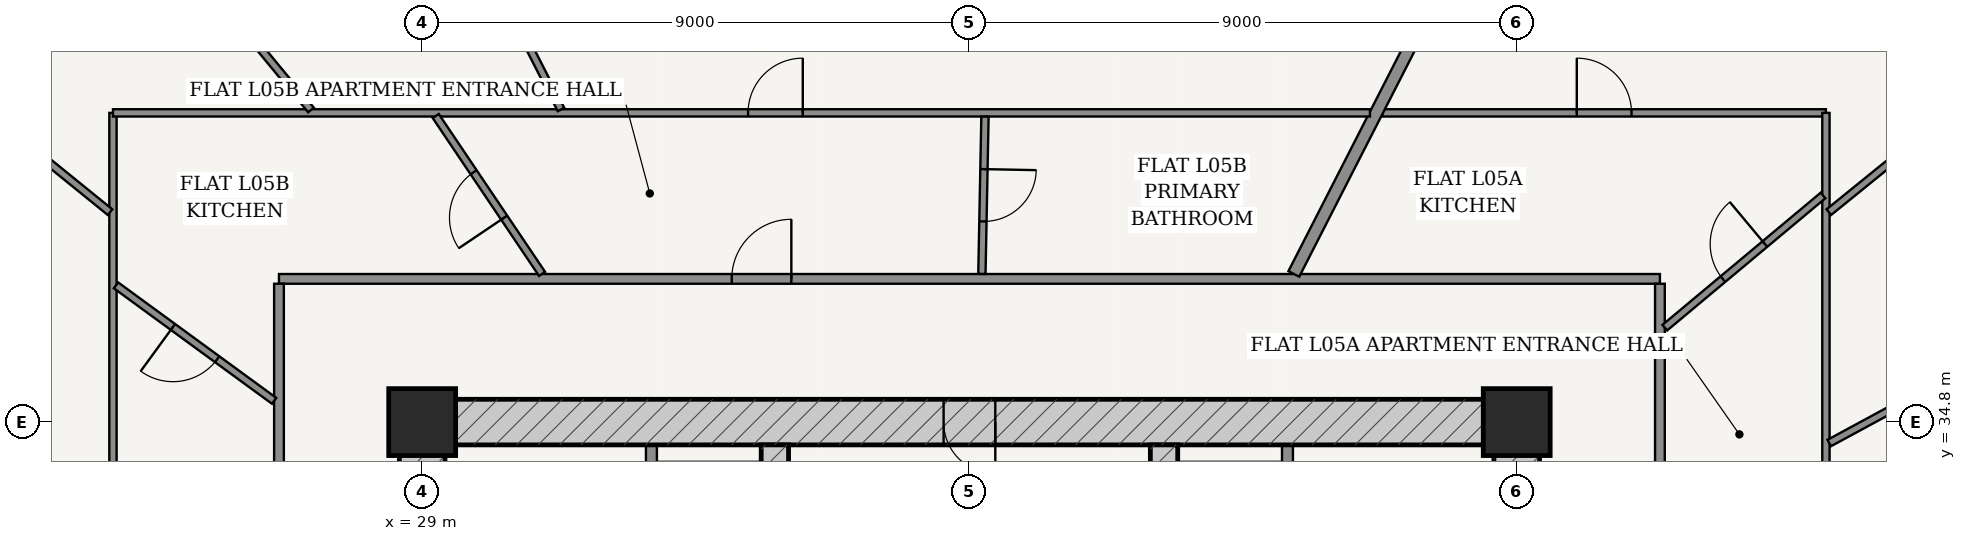
"""IFC4 building model, lengths in metres.
Left out: names, types, materials, properties, quantities, classifications, styles, units other than length and angle.
Written with IfcOpenShell. Run it as: python <this file> out.ifc"""

import sys

from ifc_helpers import new_model, si_unit, direction, frame, frame_2d, origin, origin_2d, place, context, subcontext, project, spatial, rectangle, extrude, source, transform, mapped, element, fill, save


model = new_model("IFC4")
c1 = context("Model", 3, precision=1e-05, world=origin(), true_north=direction((-0.2419218956, 0.970295726276)))
c2 = subcontext(c1, "Body", "Model", "MODEL_VIEW")
j1 = project(units=[si_unit("LENGTHUNIT", "METRE"), si_unit("PLANEANGLEUNIT", "RADIAN")], contexts=[c1])
p1 = place(None, origin())
s1 = spatial("IfcSite", under=j1, at=p1, CompositionType="ELEMENT")
p2 = place(p1, origin())
s2 = spatial("IfcBuilding", under=s1, at=p2, CompositionType="ELEMENT")
p3 = place(p2, frame((0.0, 0.0, 24.0)))
s3 = spatial("IfcBuildingStorey", under=s2, at=p3, CompositionType="ELEMENT", Elevation=24.0)
for number, where, z_axis, x_axis in (
    (1, (47.0, 34.8, 0.0), (0.0, 0.0, 1.0), (1.0, 0.0, 0.0)),
    (2, (29.0, 34.8, 0.0), (0.0, 0.0, 1.0), (1.0, 0.0, 0.0)),
):
    element("IfcColumn", number, at=place(p3, frame(where, z_axis=z_axis, x_axis=x_axis)), inside=s3, PredefinedType="COLUMN", context=c2, shape_type="SweptSolid", body=[
        extrude(rectangle(XDim=1.1, YDim=1.1, at=origin_2d()), origin(), (0.0, 0.0, 1.0), 3.6),
    ])
p4 = place(p3, frame((28.625, 34.8, 0.0), z_axis=(0.0, 0.0, 1.0), x_axis=(1.0, 0.0, 0.0)))
e3 = element("IfcWall", 3, at=p4, inside=s3, PredefinedType="SHEAR", context=c2, shape_type="SweptSolid", body=[
    extrude(rectangle(XDim=18.75, YDim=0.75, at=frame_2d((9.375, 0.0))), origin(), (0.0, 0.0, 1.0), 3.32),
])
p5 = place(p4, frame((8.95, 0.0, 0.0)))
e4 = element("IfcOpeningElement", 4, at=p5, cuts=e3, PredefinedType="OPENING", context=c2, shape_type="SweptSolid", body=[
    extrude(rectangle(XDim=0.85, YDim=2.1, at=frame_2d((0.425, 1.05))), frame((0.0, 0.385, 0.0), z_axis=(0.0, -1.0, 0.0), x_axis=(1.0, 0.0, 0.0)), (0.0, 0.0, 1.0), 0.77),
])
p6 = place(p3, frame((29.0, 19.175, 0.0), z_axis=(0.0, 0.0, 1.0), x_axis=(0.0, 1.0, 0.0)))
e5 = element("IfcWall", 5, at=p6, inside=s3, PredefinedType="SHEAR", context=c2, shape_type="SweptSolid", body=[
    extrude(rectangle(XDim=15.25, YDim=0.75, at=frame_2d((7.625, 0.0))), origin(), (0.0, 0.0, 1.0), 3.32),
])
p7 = place(p6, frame((9.875, 0.0, 0.0)))
e6 = element("IfcOpeningElement", 6, at=p7, cuts=e5, PredefinedType="OPENING", context=c2, shape_type="SweptSolid", body=[
    extrude(rectangle(XDim=1.5, YDim=2.2, at=frame_2d((0.75, 1.1))), frame((0.0, 0.385, 0.0), z_axis=(0.0, -1.0, 0.0), x_axis=(1.0, 0.0, 0.0)), (0.0, 0.0, 1.0), 0.77),
])
p8 = place(p3, frame((47.0, 19.175, 0.0), z_axis=(0.0, 0.0, 1.0), x_axis=(0.0, 1.0, 0.0)))
e7 = element("IfcWall", 7, at=p8, inside=s3, PredefinedType="SHEAR", context=c2, shape_type="SweptSolid", body=[
    extrude(rectangle(XDim=15.25, YDim=0.75, at=frame_2d((7.625, 0.0))), origin(), (0.0, 0.0, 1.0), 3.32),
])
p9 = place(p8, frame((9.875, 0.0, 0.0)))
e8 = element("IfcOpeningElement", 8, at=p9, cuts=e7, PredefinedType="OPENING", context=c2, shape_type="SweptSolid", body=[
    extrude(rectangle(XDim=1.5, YDim=2.2, at=frame_2d((0.75, 1.1))), frame((0.0, 0.385, 0.0), z_axis=(0.0, -1.0, 0.0), x_axis=(1.0, 0.0, 0.0)), (0.0, 0.0, 1.0), 0.77),
])
p10 = place(p3, frame((34.8, 19.175, 0.0), z_axis=(0.0, 0.0, 1.0), x_axis=(0.0, 1.0, 0.0)))
e9 = element("IfcWall", 9, at=p10, inside=s3, PredefinedType="SHEAR", context=c2, shape_type="SweptSolid", body=[
    extrude(rectangle(XDim=15.25, YDim=0.45, at=frame_2d((7.625, 0.0))), origin(), (0.0, 0.0, 1.0), 3.32),
])
p11 = place(p10, frame((7.8, 0.0, 0.0)))
e10 = element("IfcOpeningElement", 10, at=p11, cuts=e9, PredefinedType="OPENING", context=c2, shape_type="SweptSolid", body=[
    extrude(rectangle(XDim=1.05, YDim=2.15, at=frame_2d((0.525, 1.075))), frame((0.0, 0.235, 0.0), z_axis=(0.0, -1.0, 0.0), x_axis=(1.0, 0.0, 0.0)), (0.0, 0.0, 1.0), 0.47),
])
p12 = place(p3, frame((41.2, 19.175, 0.0), z_axis=(0.0, 0.0, 1.0), x_axis=(0.0, 1.0, 0.0)))
e11 = element("IfcWall", 11, at=p12, inside=s3, PredefinedType="SHEAR", context=c2, shape_type="SweptSolid", body=[
    extrude(rectangle(XDim=15.25, YDim=0.45, at=frame_2d((7.625, 0.0))), origin(), (0.0, 0.0, 1.0), 3.32),
])
p13 = place(p12, frame((7.8, 0.0, 0.0)))
e12 = element("IfcOpeningElement", 12, at=p13, cuts=e11, PredefinedType="OPENING", context=c2, shape_type="SweptSolid", body=[
    extrude(rectangle(XDim=1.05, YDim=2.15, at=frame_2d((0.525, 1.075))), frame((0.0, 0.235, 0.0), z_axis=(0.0, -1.0, 0.0), x_axis=(1.0, 0.0, 0.0)), (0.0, 0.0, 1.0), 0.47),
])
p14 = place(p3, frame((32.77, 28.52, 0.0), z_axis=(0.0, 0.0, 1.0), x_axis=(0.0, 1.0, 0.0)))
e13 = element("IfcWall", 13, at=p14, inside=s3, PredefinedType="PARTITIONING", context=c2, shape_type="SweptSolid", body=[
    extrude(rectangle(XDim=5.905, YDim=0.18, at=frame_2d((2.953, 0.0))), origin(), (0.0, 0.0, 1.0), 3.32),
])
p15 = place(p14, frame((3.655, 0.0, 0.0)))
e14 = element("IfcOpeningElement", 14, at=p15, cuts=e13, PredefinedType="OPENING", context=c2, shape_type="SweptSolid", body=[
    extrude(rectangle(XDim=1.15, YDim=2.2, at=frame_2d((0.575, 1.1))), frame((0.0, 0.1, 0.0), z_axis=(0.0, -1.0, 0.0), x_axis=(1.0, 0.0, 0.0)), (0.0, 0.0, 1.0), 0.2),
])
p16 = place(p14, frame((0.73, 0.0, 0.0)))
e15 = element("IfcOpeningElement", 15, at=p16, cuts=e13, PredefinedType="OPENING", context=c2, shape_type="SweptSolid", body=[
    extrude(rectangle(XDim=1.2, YDim=2.25, at=frame_2d((0.6, 1.125))), frame((0.0, 0.1, 0.0), z_axis=(0.0, -1.0, 0.0), x_axis=(1.0, 0.0, 0.0)), (0.0, 0.0, 1.0), 0.2),
])
p17 = place(p3, frame((43.23, 28.52, 0.0), z_axis=(0.0, 0.0, 1.0), x_axis=(0.0, 1.0, 0.0)))
e16 = element("IfcWall", 16, at=p17, inside=s3, PredefinedType="PARTITIONING", context=c2, shape_type="SweptSolid", body=[
    extrude(rectangle(XDim=5.905, YDim=0.18, at=frame_2d((2.953, 0.0))), origin(), (0.0, 0.0, 1.0), 3.32),
])
p18 = place(p17, frame((3.655, 0.0, 0.0)))
e17 = element("IfcOpeningElement", 17, at=p18, cuts=e16, PredefinedType="OPENING", context=c2, shape_type="SweptSolid", body=[
    extrude(rectangle(XDim=1.15, YDim=2.2, at=frame_2d((0.575, 1.1))), frame((0.0, 0.1, 0.0), z_axis=(0.0, -1.0, 0.0), x_axis=(1.0, 0.0, 0.0)), (0.0, 0.0, 1.0), 0.2),
])
p19 = place(p3, frame((26.645, 37.155, 0.0), z_axis=(0.0, 0.0, 1.0), x_axis=(1.0, 0.0, 0.0)))
e18 = element("IfcWall", 18, at=p19, inside=s3, PredefinedType="PARTITIONING", context=c2, shape_type="SweptSolid", body=[
    extrude(rectangle(XDim=22.71, YDim=0.16, at=frame_2d((11.355, 0.0))), origin(), (0.0, 0.0, 1.0), 2.688),
])
p20 = place(p19, frame((7.446, 0.0, 0.0)))
e19 = element("IfcOpeningElement", 19, at=p20, cuts=e18, PredefinedType="OPENING", context=c2, shape_type="SweptSolid", body=[
    extrude(rectangle(XDim=0.98, YDim=2.2, at=frame_2d((0.49, 1.1))), frame((0.0, 0.09, 0.0), z_axis=(0.0, -1.0, 0.0), x_axis=(1.0, 0.0, 0.0)), (0.0, 0.0, 1.0), 0.18),
])
p21 = place(p3, frame((26.645, 16.525, 0.0), z_axis=(0.0, 0.0, 1.0), x_axis=(0.0, 1.0, 0.0)))
e20 = element("IfcWall", 20, at=p21, inside=s3, PredefinedType="PARTITIONING", context=c2, shape_type="SweptSolid", body=[
    extrude(rectangle(XDim=20.55, YDim=0.16, at=frame_2d((10.275, 0.0))), origin(), (0.0, 0.0, 1.0), 2.688),
])
p22 = place(p3, frame((49.355, 16.525, 0.0), z_axis=(0.0, 0.0, 1.0), x_axis=(0.0, 1.0, 0.0)))
e21 = element("IfcWall", 21, at=p22, inside=s3, PredefinedType="PARTITIONING", context=c2, shape_type="SweptSolid", body=[
    extrude(rectangle(XDim=20.55, YDim=0.16, at=frame_2d((10.275, 0.0))), origin(), (0.0, 0.0, 1.0), 2.688),
])
p23 = place(p22, frame((15.635, 0.0, 0.0)))
e22 = element("IfcOpeningElement", 22, at=p23, cuts=e21, PredefinedType="OPENING", context=c2, shape_type="SweptSolid", body=[
    extrude(rectangle(XDim=0.98, YDim=2.2, at=frame_2d((0.49, 1.1))), frame((0.0, 0.09, 0.0), z_axis=(0.0, -1.0, 0.0), x_axis=(1.0, 0.0, 0.0)), (0.0, 0.0, 1.0), 0.18),
])
p24 = place(p3, frame((44.791, 39.885, 0.0), z_axis=(0.0, 0.0, 1.0), x_axis=(1.0, 0.0, 0.0)))
e23 = element("IfcWall", 23, at=p24, inside=s3, PredefinedType="PARTITIONING", context=c2, shape_type="SweptSolid", body=[
    extrude(rectangle(XDim=7.294, YDim=0.12, at=frame_2d((3.647, 0.0))), origin(), (0.0, 0.0, 1.0), 2.688),
])
p25 = place(p24, frame((3.197, 0.0, 0.0)))
e24 = element("IfcOpeningElement", 24, at=p25, cuts=e23, PredefinedType="OPENING", context=c2, shape_type="SweptSolid", body=[
    extrude(rectangle(XDim=0.9, YDim=2.15, at=frame_2d((0.45, 1.075))), frame((0.0, 0.07, 0.0), z_axis=(0.0, -1.0, 0.0), x_axis=(1.0, 0.0, 0.0)), (0.0, 0.0, 1.0), 0.14),
])
p26 = place(p3, frame((52.085, 39.885, 0.0), z_axis=(0.0, 0.0, 1.0), x_axis=(0.0, -1.0, 0.0)))
e25 = element("IfcWall", 25, at=p26, inside=s3, PredefinedType="PARTITIONING", context=c2, shape_type="SweptSolid", body=[
    extrude(rectangle(XDim=15.253, YDim=0.12, at=frame_2d((7.627, 0.0))), origin(), (0.0, 0.0, 1.0), 2.688),
])
p27 = place(p26, frame((9.002, 0.0, 0.0)))
e26 = element("IfcOpeningElement", 26, at=p27, cuts=e25, PredefinedType="OPENING", context=c2, shape_type="SweptSolid", body=[
    extrude(rectangle(XDim=0.9, YDim=2.15, at=frame_2d((0.45, 1.075))), frame((0.0, 0.07, 0.0), z_axis=(0.0, -1.0, 0.0), x_axis=(1.0, 0.0, 0.0)), (0.0, 0.0, 1.0), 0.14),
])
p28 = place(p3, frame((52.144, 31.547, 0.0), z_axis=(0.0, 0.0, 1.0), x_axis=(0.948017487737, 0.318218231634, 0.0)))
e27 = element("IfcWall", 27, at=p28, inside=s3, PredefinedType="PARTITIONING", context=c2, shape_type="SweptSolid", body=[
    extrude(rectangle(XDim=13.279, YDim=0.12, at=frame_2d((6.639, 0.0))), origin(), (0.0, 0.0, 1.0), 2.762),
])
p29 = place(p28, frame((6.189, 0.0, 0.0)))
e28 = element("IfcOpeningElement", 28, at=p29, cuts=e27, PredefinedType="OPENING", context=c2, shape_type="SweptSolid", body=[
    extrude(rectangle(XDim=0.9, YDim=2.15, at=frame_2d((0.45, 1.075))), frame((0.0, 0.07, 0.0), z_axis=(0.0, -1.0, 0.0), x_axis=(1.0, 0.0, 0.0)), (0.0, 0.0, 1.0), 0.14),
])
p30 = place(p3, frame((52.139, 34.456, 0.0), z_axis=(0.0, 0.0, 1.0), x_axis=(0.879372452045, 0.476134529922, 0.0)))
e29 = element("IfcWall", 29, at=p30, inside=s3, PredefinedType="PARTITIONING", context=c2, shape_type="SweptSolid", body=[
    extrude(rectangle(XDim=11.219, YDim=0.12, at=frame_2d((5.61, 0.0))), origin(), (0.0, 0.0, 1.0), 2.688),
])
p31 = place(p30, frame((4.102, 0.0, 0.0)))
e30 = element("IfcOpeningElement", 30, at=p31, cuts=e29, PredefinedType="OPENING", context=c2, shape_type="SweptSolid", body=[
    extrude(rectangle(XDim=0.9, YDim=2.15, at=frame_2d((0.45, 1.075))), frame((0.0, 0.07, 0.0), z_axis=(0.0, -1.0, 0.0), x_axis=(1.0, 0.0, 0.0)), (0.0, 0.0, 1.0), 0.14),
])
p32 = place(p3, frame((52.133, 38.253, 0.0), z_axis=(0.0, 0.0, 1.0), x_axis=(0.776936623447, 0.629578814087, 0.0)))
e31 = element("IfcWall", 31, at=p32, inside=s3, PredefinedType="PARTITIONING", context=c2, shape_type="SweptSolid", body=[
    extrude(rectangle(XDim=8.136, YDim=0.12, at=frame_2d((4.068, 0.0))), origin(), (0.0, 0.0, 1.0), 2.762),
])
p33 = place(p3, frame((49.435, 36.353, 0.0), z_axis=(0.0, 0.0, 1.0), x_axis=(0.76742398833, 0.641139939589, 0.0)))
e32 = element("IfcWall", 32, at=p33, inside=s3, PredefinedType="PARTITIONING", context=c2, shape_type="SweptSolid", body=[
    extrude(rectangle(XDim=3.391, YDim=0.12, at=frame_2d((1.695, 0.0))), origin(), (0.0, 0.0, 1.0), 2.999),
])
p34 = place(p33, frame((1.246, 0.0, 0.0)))
e33 = element("IfcOpeningElement", 33, at=p34, cuts=e32, PredefinedType="OPENING", context=c2, shape_type="SweptSolid", body=[
    extrude(rectangle(XDim=0.9, YDim=2.15, at=frame_2d((0.45, 1.075))), frame((0.0, 0.07, 0.0), z_axis=(0.0, -1.0, 0.0), x_axis=(1.0, 0.0, 0.0)), (0.0, 0.0, 1.0), 0.14),
])
p35 = place(p3, frame((43.335, 37.237, 0.0), z_axis=(0.0, 0.0, 1.0), x_axis=(0.455148959499, 0.890415310216, 0.0)))
e34 = element("IfcWall", 34, at=p35, inside=s3, PredefinedType="PARTITIONING", context=c2, shape_type="SweptSolid", body=[
    extrude(rectangle(XDim=12.598, YDim=0.2, at=frame_2d((6.299, 0.0))), origin(), (0.0, 0.0, 1.0), 2.762),
])
p36 = place(p3, frame((23.915, 29.172, 0.0), z_axis=(0.0, 0.0, 1.0), x_axis=(0.0, 1.0, 0.0)))
e35 = element("IfcWall", 35, at=p36, inside=s3, PredefinedType="PARTITIONING", context=c2, shape_type="SweptSolid", body=[
    extrude(rectangle(XDim=10.713, YDim=0.12, at=frame_2d((5.356, 0.0))), origin(), (0.0, 0.0, 1.0), 2.688),
])
p37 = place(p36, frame((3.666, 0.0, 0.0)))
e36 = element("IfcOpeningElement", 36, at=p37, cuts=e35, PredefinedType="OPENING", context=c2, shape_type="SweptSolid", body=[
    extrude(rectangle(XDim=0.9, YDim=2.15, at=frame_2d((0.45, 1.075))), frame((0.0, 0.07, 0.0), z_axis=(0.0, -1.0, 0.0), x_axis=(1.0, 0.0, 0.0)), (0.0, 0.0, 1.0), 0.14),
])
p38 = place(p3, frame((23.915, 39.885, 0.0), z_axis=(0.0, 0.0, 1.0), x_axis=(1.0, 0.0, 0.0)))
e37 = element("IfcWall", 37, at=p38, inside=s3, PredefinedType="PARTITIONING", context=c2, shape_type="SweptSolid", body=[
    extrude(rectangle(XDim=20.671, YDim=0.12, at=frame_2d((10.336, 0.0))), origin(), (0.0, 0.0, 1.0), 2.688),
])
p39 = place(p38, frame((10.444, 0.0, 0.0)))
e38 = element("IfcOpeningElement", 38, at=p39, cuts=e37, PredefinedType="OPENING", context=c2, shape_type="SweptSolid", body=[
    extrude(rectangle(XDim=0.9, YDim=2.15, at=frame_2d((0.45, 1.075))), frame((0.0, 0.07, 0.0), z_axis=(0.0, -1.0, 0.0), x_axis=(1.0, 0.0, 0.0)), (0.0, 0.0, 1.0), 0.14),
])
p40 = place(p3, frame((31.283, 39.94, 0.0), z_axis=(0.0, 0.0, 1.0), x_axis=(-0.455131303234, 0.890424335256, 0.0)))
e39 = element("IfcWall", 39, at=p40, inside=s3, PredefinedType="PARTITIONING", context=c2, shape_type="SweptSolid", body=[
    extrude(rectangle(XDim=9.562, YDim=0.12, at=frame_2d((4.781, 0.0))), origin(), (0.0, 0.0, 1.0), 2.762),
])
p41 = place(p40, frame((4.331, 0.0, 0.0)))
e40 = element("IfcOpeningElement", 40, at=p41, cuts=e39, PredefinedType="OPENING", context=c2, shape_type="SweptSolid", body=[
    extrude(rectangle(XDim=0.9, YDim=2.15, at=frame_2d((0.45, 1.075))), frame((0.0, 0.07, 0.0), z_axis=(0.0, -1.0, 0.0), x_axis=(1.0, 0.0, 0.0)), (0.0, 0.0, 1.0), 0.14),
])
p42 = place(p3, frame((27.171, 39.933, 0.0), z_axis=(0.0, 0.0, 1.0), x_axis=(-0.636192172227, 0.771530634516, 0.0)))
e41 = element("IfcWall", 41, at=p42, inside=s3, PredefinedType="PARTITIONING", context=c2, shape_type="SweptSolid", body=[
    extrude(rectangle(XDim=8.186, YDim=0.12, at=frame_2d((4.093, 0.0))), origin(), (0.0, 0.0, 1.0), 2.688),
])
p43 = place(p42, frame((2.579, 0.0, 0.0)))
e42 = element("IfcOpeningElement", 42, at=p43, cuts=e41, PredefinedType="OPENING", context=c2, shape_type="SweptSolid", body=[
    extrude(rectangle(XDim=0.9, YDim=2.15, at=frame_2d((0.45, 1.075))), frame((0.0, 0.07, 0.0), z_axis=(0.0, -1.0, 0.0), x_axis=(1.0, 0.0, 0.0)), (0.0, 0.0, 1.0), 0.14),
])
p44 = place(p3, frame((23.867, 38.253, 0.0), z_axis=(0.0, 0.0, 1.0), x_axis=(-0.776936623447, 0.629578814087, 0.0)))
e43 = element("IfcWall", 43, at=p44, inside=s3, PredefinedType="PARTITIONING", context=c2, shape_type="SweptSolid", body=[
    extrude(rectangle(XDim=8.136, YDim=0.12, at=frame_2d((4.068, 0.0))), origin(), (0.0, 0.0, 1.0), 2.762),
])
p45 = place(p3, frame((38.205, 37.237, 0.0), z_axis=(0.0, 0.0, 1.0), x_axis=(0.019633676934, 0.999807240787, 0.0)))
e44 = element("IfcWall", 44, at=p45, inside=s3, PredefinedType="PARTITIONING", context=c2, shape_type="SweptSolid", body=[
    extrude(rectangle(XDim=2.586, YDim=0.12, at=frame_2d((1.293, 0.0))), origin(), (0.0, 0.0, 1.0), 3.32),
])
p46 = place(p45, frame((0.863, 0.0, 0.0)))
e45 = element("IfcOpeningElement", 45, at=p46, cuts=e44, PredefinedType="OPENING", context=c2, shape_type="SweptSolid", body=[
    extrude(rectangle(XDim=0.86, YDim=2.15, at=frame_2d((0.43, 1.075))), frame((0.0, 0.07, 0.0), z_axis=(0.0, -1.0, 0.0), x_axis=(1.0, 0.0, 0.0)), (0.0, 0.0, 1.0), 0.14),
])
p47 = place(p3, frame((30.972, 37.237, 0.0), z_axis=(0.0, 0.0, 1.0), x_axis=(-0.558563154585, 0.829461995717, 0.0)))
e46 = element("IfcWall", 46, at=p47, inside=s3, PredefinedType="PARTITIONING", context=c2, shape_type="SweptSolid", body=[
    extrude(rectangle(XDim=3.131, YDim=0.12, at=frame_2d((1.565, 0.0))), origin(), (0.0, 0.0, 1.0), 3.32),
])
p48 = place(p47, frame((1.115, 0.0, 0.0)))
e47 = element("IfcOpeningElement", 47, at=p48, cuts=e46, PredefinedType="OPENING", context=c2, shape_type="SweptSolid", body=[
    extrude(rectangle(XDim=0.9, YDim=2.15, at=frame_2d((0.45, 1.075))), frame((0.0, 0.07, 0.0), z_axis=(0.0, -1.0, 0.0), x_axis=(1.0, 0.0, 0.0)), (0.0, 0.0, 1.0), 0.14),
])
p49 = place(p3, frame((26.565, 35.15, 0.0), z_axis=(0.0, 0.0, 1.0), x_axis=(-0.807606444557, 0.589721824855, 0.0)))
e48 = element("IfcWall", 48, at=p49, inside=s3, PredefinedType="PARTITIONING", context=c2, shape_type="SweptSolid", body=[
    extrude(rectangle(XDim=3.219, YDim=0.12, at=frame_2d((1.61, 0.0))), origin(), (0.0, 0.0, 1.0), 3.32),
])
p50 = place(p49, frame((1.16, 0.0, 0.0)))
e49 = element("IfcOpeningElement", 49, at=p50, cuts=e48, PredefinedType="OPENING", context=c2, shape_type="SweptSolid", body=[
    extrude(rectangle(XDim=0.9, YDim=2.15, at=frame_2d((0.45, 1.075))), frame((0.0, 0.07, 0.0), z_axis=(0.0, -1.0, 0.0), x_axis=(1.0, 0.0, 0.0)), (0.0, 0.0, 1.0), 0.14),
])
m1 = source(origin(), c2, "Body", "SweptSolid", [
    extrude(rectangle(XDim=0.85, YDim=2.1, at=frame_2d((0.425, 1.05))), frame((0.0, 0.025, 0.0), z_axis=(0.0, -1.0, 0.0), x_axis=(1.0, 0.0, 0.0)), (0.0, 0.0, 1.0), 0.05),
])
p51 = place(p5, frame((0.85, 0.0, 0.0), z_axis=(0.0, 0.0, 1.0), x_axis=(-1.0, 0.0, 0.0)))
e50 = element("IfcDoor", 50, at=p51, inside=s3, OperationType="SINGLE_SWING_LEFT", PredefinedType="DOOR", context=c2, shape_type="MappedRepresentation", body=[
    mapped(m1, transform((0.0, 0.0, 0.0), scale=1.0)),
])
fill(e4, e50)
m2 = source(origin(), c2, "Body", "SweptSolid", [
    extrude(rectangle(XDim=0.9, YDim=2.15, at=frame_2d((0.45, 1.075))), frame((0.0, 0.025, 0.0), z_axis=(0.0, -1.0, 0.0), x_axis=(1.0, 0.0, 0.0)), (0.0, 0.0, 1.0), 0.05),
])
p52 = place(p34, origin())
e51 = element("IfcDoor", 51, at=p52, inside=s3, OperationType="SINGLE_SWING_RIGHT", PredefinedType="DOOR", context=c2, shape_type="MappedRepresentation", body=[
    mapped(m2, transform((0.0, 0.0, 0.0), scale=1.0)),
])
fill(e33, e51)
p53 = place(p25, origin())
e52 = element("IfcDoor", 52, at=p53, inside=s3, OperationType="SINGLE_SWING_LEFT", PredefinedType="DOOR", context=c2, shape_type="MappedRepresentation", body=[
    mapped(m2, transform((0.0, 0.0, 0.0), scale=1.0)),
])
fill(e24, e52)
m3 = source(origin(), c2, "Body", "SweptSolid", [
    extrude(rectangle(XDim=0.98, YDim=2.2, at=frame_2d((0.49, 1.1))), frame((0.0, 0.025, 0.0), z_axis=(0.0, -1.0, 0.0), x_axis=(1.0, 0.0, 0.0)), (0.0, 0.0, 1.0), 0.05),
])
p54 = place(p20, origin())
e53 = element("IfcDoor", 53, at=p54, inside=s3, OperationType="SINGLE_SWING_RIGHT", PredefinedType="DOOR", context=c2, shape_type="MappedRepresentation", body=[
    mapped(m3, transform((0.0, 0.0, 0.0), scale=1.0)),
])
fill(e19, e53)
m4 = source(origin(), c2, "Body", "SweptSolid", [
    extrude(rectangle(XDim=0.86, YDim=2.15, at=frame_2d((0.43, 1.075))), frame((0.0, 0.025, 0.0), z_axis=(0.0, -1.0, 0.0), x_axis=(1.0, 0.0, 0.0)), (0.0, 0.0, 1.0), 0.05),
])
p55 = place(p46, frame((0.86, 0.0, 0.0), z_axis=(0.0, 0.0, 1.0), x_axis=(-1.0, 0.0, 0.0)))
e54 = element("IfcDoor", 54, at=p55, inside=s3, OperationType="SINGLE_SWING_LEFT", PredefinedType="DOOR", context=c2, shape_type="MappedRepresentation", body=[
    mapped(m4, transform((0.0, 0.0, 0.0), scale=1.0)),
])
fill(e45, e54)
p56 = place(p39, origin())
e55 = element("IfcDoor", 55, at=p56, inside=s3, OperationType="SINGLE_SWING_RIGHT", PredefinedType="DOOR", context=c2, shape_type="MappedRepresentation", body=[
    mapped(m2, transform((0.0, 0.0, 0.0), scale=1.0)),
])
fill(e38, e55)
p57 = place(p48, origin())
e56 = element("IfcDoor", 56, at=p57, inside=s3, OperationType="SINGLE_SWING_LEFT", PredefinedType="DOOR", context=c2, shape_type="MappedRepresentation", body=[
    mapped(m2, transform((0.0, 0.0, 0.0), scale=1.0)),
])
fill(e47, e56)
p58 = place(p50, origin())
e57 = element("IfcDoor", 57, at=p58, inside=s3, OperationType="SINGLE_SWING_RIGHT", PredefinedType="DOOR", context=c2, shape_type="MappedRepresentation", body=[
    mapped(m2, transform((0.0, 0.0, 0.0), scale=1.0)),
])
fill(e49, e57)
save(model, sys.argv[1])
